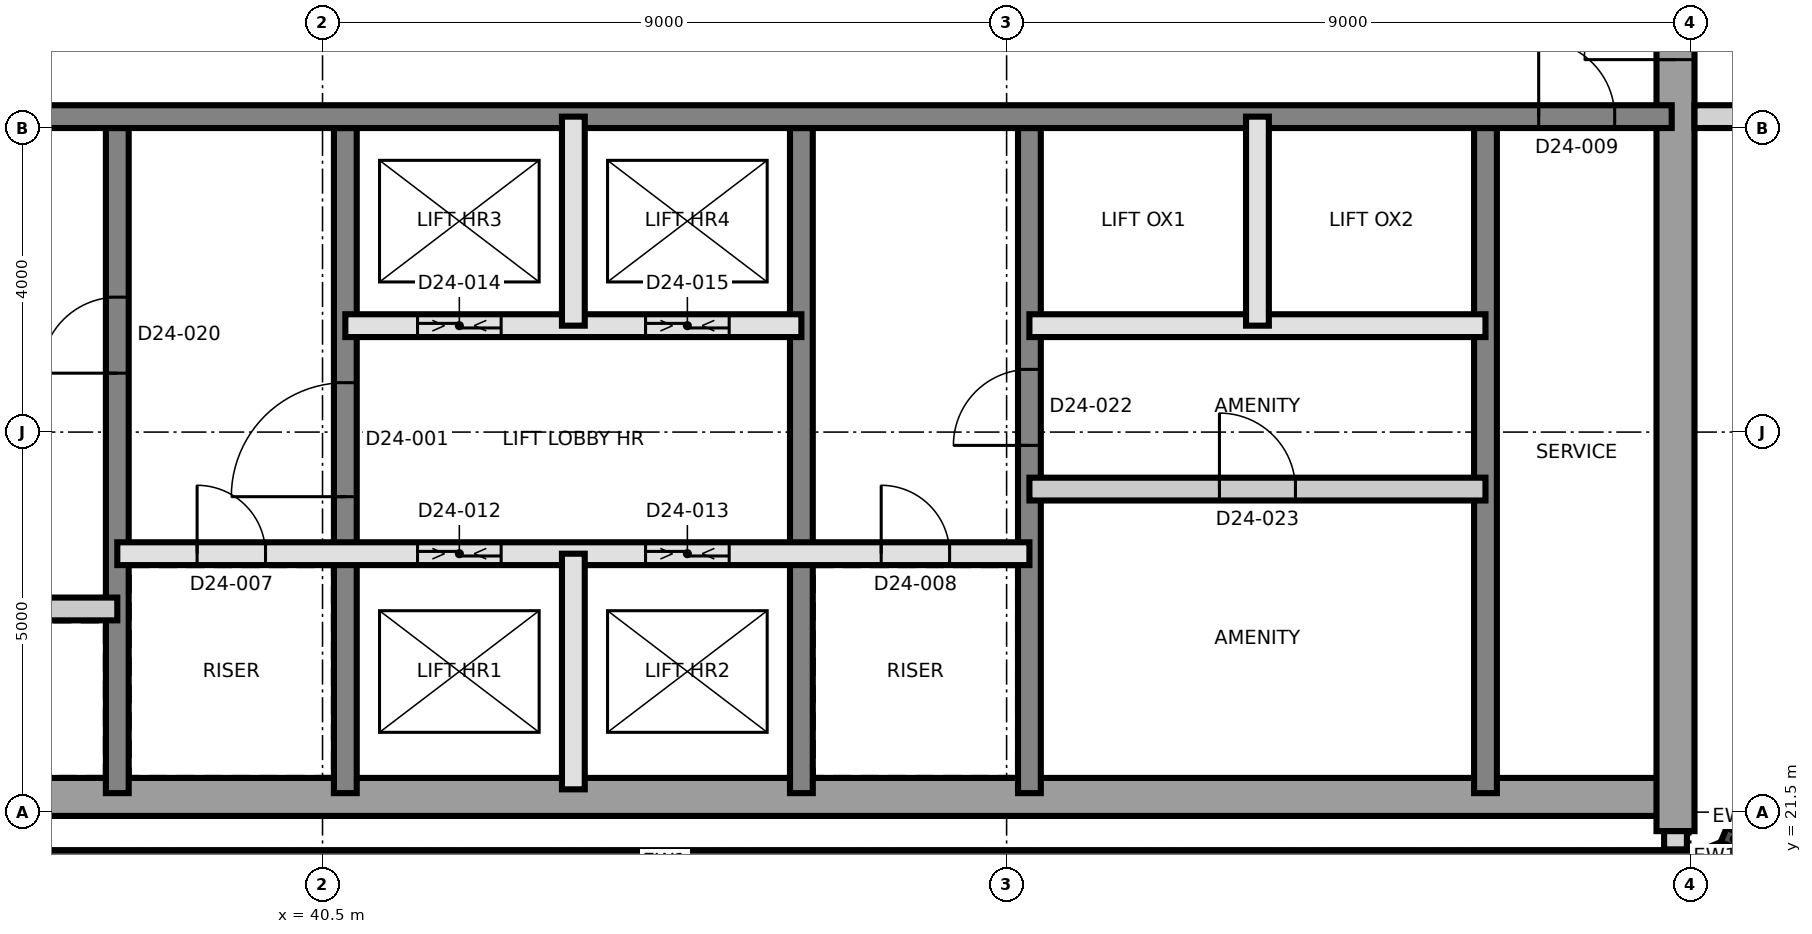
"""IFC4 building model, lengths in metres.
Left out: names, types, materials, properties, quantities, classifications, styles, units other than length and angle.
Written with IfcOpenShell. Run it as: python <this file> out.ifc"""

import sys

from ifc_helpers import new_model, si_unit, direction, frame, frame_2d, origin, place, context, subcontext, project, spatial, rectangle, extrude, element, fill, save


model = new_model("IFC4")
c1 = context("Model", 3, precision=1e-05, world=origin(), true_north=direction((0.0, 1.0)))
c2 = subcontext(c1, "Body", "Model", "MODEL_VIEW")
j1 = project(units=[si_unit("LENGTHUNIT", "METRE"), si_unit("PLANEANGLEUNIT", "RADIAN")], contexts=[c1])
p1 = place(None, origin())
s1 = spatial("IfcSite", under=j1, at=p1, CompositionType="ELEMENT")
p2 = place(p1, origin())
s2 = spatial("IfcBuilding", under=s1, at=p2, CompositionType="ELEMENT")
p3 = place(p2, frame((0.0, 0.0, 218.0)))
s3 = spatial("IfcBuildingStorey", under=s2, at=p3, CompositionType="ELEMENT", Elevation=218.0)
p4 = place(p3, frame((31.25, 21.7, 0.0), z_axis=(0.0, 0.0, 1.0), x_axis=(1.0, 0.0, 0.0)))
e1 = element("IfcWall", 1, at=p4, inside=s3, PredefinedType="SHEAR", context=c2, shape_type="SweptSolid", body=[
    extrude(rectangle(XDim=27.0, YDim=0.5, at=frame_2d((13.5, 0.0))), origin(), (0.0, 0.0, 1.0), 3.7),
])
p5 = place(p3, frame((58.3, 21.25, 0.0), z_axis=(0.0, 0.0, 1.0), x_axis=(0.0, 1.0, 0.0)))
e2 = element("IfcWall", 2, at=p5, inside=s3, PredefinedType="SHEAR", context=c2, shape_type="SweptSolid", body=[
    extrude(rectangle(XDim=18.5, YDim=0.5, at=frame_2d((9.25, 0.0))), origin(), (0.0, 0.0, 1.0), 3.7),
])
p6 = place(p5, frame((10.15, 0.0, 0.0)))
e3 = element("IfcOpeningElement", 3, at=p6, cuts=e2, PredefinedType="OPENING", context=c2, shape_type="SweptSolid", body=[
    extrude(rectangle(XDim=1.2, YDim=2.1, at=frame_2d((0.6, 1.05))), frame((0.0, 0.26, 0.0), z_axis=(0.0, -1.0, 0.0), x_axis=(1.0, 0.0, 0.0)), (0.0, 0.0, 1.0), 0.52),
])
p7 = place(p3, frame((37.8, 21.75, 0.0), z_axis=(0.0, 0.0, 1.0), x_axis=(0.0, 1.0, 0.0)))
e4 = element("IfcWall", 4, at=p7, inside=s3, PredefinedType="SHEAR", context=c2, shape_type="SweptSolid", body=[
    extrude(rectangle(XDim=8.75, YDim=0.3, at=frame_2d((4.375, 0.0))), origin(), (0.0, 0.0, 1.0), 3.7),
])
p8 = place(p7, frame((5.525, 0.0, 0.0)))
e5 = element("IfcOpeningElement", 5, at=p8, cuts=e4, PredefinedType="OPENING", context=c2, shape_type="SweptSolid", body=[
    extrude(rectangle(XDim=1.0, YDim=2.1, at=frame_2d((0.5, 1.05))), frame((0.0, 0.16, 0.0), z_axis=(0.0, -1.0, 0.0), x_axis=(1.0, 0.0, 0.0)), (0.0, 0.0, 1.0), 0.32),
])
p9 = place(p3, frame((40.8, 21.75, 0.0), z_axis=(0.0, 0.0, 1.0), x_axis=(0.0, 1.0, 0.0)))
e6 = element("IfcWall", 6, at=p9, inside=s3, PredefinedType="SHEAR", context=c2, shape_type="SweptSolid", body=[
    extrude(rectangle(XDim=8.75, YDim=0.3, at=frame_2d((4.375, 0.0))), origin(), (0.0, 0.0, 1.0), 3.7),
])
p10 = place(p9, frame((3.9, 0.0, 0.0)))
e7 = element("IfcOpeningElement", 7, at=p10, cuts=e6, PredefinedType="OPENING", context=c2, shape_type="SweptSolid", body=[
    extrude(rectangle(XDim=1.5, YDim=2.1, at=frame_2d((0.75, 1.05))), frame((0.0, 0.16, 0.0), z_axis=(0.0, -1.0, 0.0), x_axis=(1.0, 0.0, 0.0)), (0.0, 0.0, 1.0), 0.32),
])
p11 = place(p3, frame((46.8, 21.75, 0.0), z_axis=(0.0, 0.0, 1.0), x_axis=(0.0, 1.0, 0.0)))
e8 = element("IfcWall", 8, at=p11, inside=s3, PredefinedType="SHEAR", context=c2, shape_type="SweptSolid", body=[
    extrude(rectangle(XDim=8.75, YDim=0.3, at=frame_2d((4.375, 0.0))), origin(), (0.0, 0.0, 1.0), 3.7),
])
p12 = place(p3, frame((49.8, 21.75, 0.0), z_axis=(0.0, 0.0, 1.0), x_axis=(0.0, 1.0, 0.0)))
e9 = element("IfcWall", 9, at=p12, inside=s3, PredefinedType="SHEAR", context=c2, shape_type="SweptSolid", body=[
    extrude(rectangle(XDim=8.75, YDim=0.3, at=frame_2d((4.375, 0.0))), origin(), (0.0, 0.0, 1.0), 3.7),
])
p13 = place(p12, frame((4.575, 0.0, 0.0)))
e10 = element("IfcOpeningElement", 10, at=p13, cuts=e9, PredefinedType="OPENING", context=c2, shape_type="SweptSolid", body=[
    extrude(rectangle(XDim=1.0, YDim=2.1, at=frame_2d((0.5, 1.05))), frame((0.0, 0.16, 0.0), z_axis=(0.0, -1.0, 0.0), x_axis=(1.0, 0.0, 0.0)), (0.0, 0.0, 1.0), 0.32),
])
p14 = place(p3, frame((55.8, 21.75, 0.0), z_axis=(0.0, 0.0, 1.0), x_axis=(0.0, 1.0, 0.0)))
e11 = element("IfcWall", 11, at=p14, inside=s3, PredefinedType="SHEAR", context=c2, shape_type="SweptSolid", body=[
    extrude(rectangle(XDim=8.75, YDim=0.3, at=frame_2d((4.375, 0.0))), origin(), (0.0, 0.0, 1.0), 3.7),
])
p15 = place(p3, frame((31.75, 30.65, 0.0), z_axis=(0.0, 0.0, 1.0), x_axis=(1.0, 0.0, 0.0)))
e12 = element("IfcWall", 12, at=p15, inside=s3, PredefinedType="SHEAR", context=c2, shape_type="SweptSolid", body=[
    extrude(rectangle(XDim=26.5, YDim=0.3, at=frame_2d((13.25, 0.0))), origin(), (0.0, 0.0, 1.0), 3.7),
])
p16 = place(p15, frame((24.75, 0.0, 0.0)))
e13 = element("IfcOpeningElement", 13, at=p16, cuts=e12, PredefinedType="OPENING", context=c2, shape_type="SweptSolid", body=[
    extrude(rectangle(XDim=1.0, YDim=2.1, at=frame_2d((0.5, 1.05))), frame((0.0, 0.16, 0.0), z_axis=(0.0, -1.0, 0.0), x_axis=(1.0, 0.0, 0.0)), (0.0, 0.0, 1.0), 0.32),
])
p17 = place(p3, frame((31.36, 20.85, 0.0), z_axis=(0.0, 0.0, 1.0), x_axis=(1.0, 0.0, 0.0)))
e14 = element("IfcWall", 14, at=p17, inside=s3, PredefinedType="SOLIDWALL", context=c2, shape_type="SweptSolid", body=[
    extrude(rectangle(XDim=27.281, YDim=0.3, at=frame_2d((13.64, 0.0))), origin(), (0.0, 0.0, 1.0), 3.4),
])
p18 = place(p3, frame((58.698, 20.861, 0.0), z_axis=(0.0, 0.0, 1.0), x_axis=(0.923757413239, 0.38297812142, 0.0)))
e15 = element("IfcWall", 15, at=p18, inside=s3, PredefinedType="SOLIDWALL", context=c2, shape_type="SweptSolid", body=[
    extrude(rectangle(XDim=0.275, YDim=0.3, at=frame_2d((0.138, 0.0))), origin(), (0.0, 0.0, 1.0), 3.4),
])
p19 = place(p3, frame((59.033, 21.048, 0.0), z_axis=(0.0, 0.0, 1.0), x_axis=(0.383262727373, 0.923639367831, 0.0)))
e16 = element("IfcWall", 16, at=p19, inside=s3, PredefinedType="SOLIDWALL", context=c2, shape_type="SweptSolid", body=[
    extrude(rectangle(XDim=0.205, YDim=0.3, at=frame_2d((0.103, 0.0))), origin(), (0.0, 0.0, 1.0), 3.4),
])
p20 = place(p3, frame((31.8, 24.173, 0.0), z_axis=(0.0, 0.0, 1.0), x_axis=(1.0, 0.0, 0.0)))
e17 = element("IfcWall", 17, at=p20, inside=s3, PredefinedType="PARTITIONING", context=c2, shape_type="SweptSolid", body=[
    extrude(rectangle(XDim=6.0, YDim=0.3, at=frame_2d((3.0, 0.0))), origin(), (0.0, 0.0, 1.0), 3.4),
])
p21 = place(p20, frame((2.5, 0.0, 0.0)))
e18 = element("IfcOpeningElement", 18, at=p21, cuts=e17, PredefinedType="OPENING", context=c2, shape_type="SweptSolid", body=[
    extrude(rectangle(XDim=1.0, YDim=2.1, at=frame_2d((0.5, 1.05))), frame((0.0, 0.16, 0.0), z_axis=(0.0, -1.0, 0.0), x_axis=(1.0, 0.0, 0.0)), (0.0, 0.0, 1.0), 0.32),
])
p22 = place(p3, frame((37.8, 24.9, 0.0), z_axis=(0.0, 0.0, 1.0), x_axis=(1.0, 0.0, 0.0)))
e19 = element("IfcWall", 19, at=p22, inside=s3, PredefinedType="SOLIDWALL", context=c2, shape_type="SweptSolid", body=[
    extrude(rectangle(XDim=12.0, YDim=0.3, at=frame_2d((6.0, 0.0))), origin(), (0.0, 0.0, 1.0), 3.4),
])
p23 = place(p22, frame((1.05, 0.0, 0.0)))
e20 = element("IfcOpeningElement", 20, at=p23, cuts=e19, PredefinedType="OPENING", context=c2, shape_type="SweptSolid", body=[
    extrude(rectangle(XDim=0.9, YDim=2.1, at=frame_2d((0.45, 1.05))), frame((0.0, 0.16, 0.0), z_axis=(0.0, -1.0, 0.0), x_axis=(1.0, 0.0, 0.0)), (0.0, 0.0, 1.0), 0.32),
])
p24 = place(p22, frame((10.05, 0.0, 0.0)))
e21 = element("IfcOpeningElement", 21, at=p24, cuts=e19, PredefinedType="OPENING", context=c2, shape_type="SweptSolid", body=[
    extrude(rectangle(XDim=0.9, YDim=2.1, at=frame_2d((0.45, 1.05))), frame((0.0, 0.16, 0.0), z_axis=(0.0, -1.0, 0.0), x_axis=(1.0, 0.0, 0.0)), (0.0, 0.0, 1.0), 0.32),
])
p25 = place(p22, frame((3.95, 0.0, 0.0)))
e22 = element("IfcOpeningElement", 22, at=p25, cuts=e19, PredefinedType="OPENING", context=c2, shape_type="SweptSolid", body=[
    extrude(rectangle(XDim=1.1, YDim=2.4, at=frame_2d((0.55, 1.2))), frame((0.0, 0.16, 0.0), z_axis=(0.0, -1.0, 0.0), x_axis=(1.0, 0.0, 0.0)), (0.0, 0.0, 1.0), 0.32),
])
p26 = place(p22, frame((6.95, 0.0, 0.0)))
e23 = element("IfcOpeningElement", 23, at=p26, cuts=e19, PredefinedType="OPENING", context=c2, shape_type="SweptSolid", body=[
    extrude(rectangle(XDim=1.1, YDim=2.4, at=frame_2d((0.55, 1.2))), frame((0.0, 0.16, 0.0), z_axis=(0.0, -1.0, 0.0), x_axis=(1.0, 0.0, 0.0)), (0.0, 0.0, 1.0), 0.32),
])
p27 = place(p3, frame((49.8, 25.75, 0.0), z_axis=(0.0, 0.0, 1.0), x_axis=(1.0, 0.0, 0.0)))
e24 = element("IfcWall", 24, at=p27, inside=s3, PredefinedType="PARTITIONING", context=c2, shape_type="SweptSolid", body=[
    extrude(rectangle(XDim=6.0, YDim=0.3, at=frame_2d((3.0, 0.0))), origin(), (0.0, 0.0, 1.0), 3.4),
])
p28 = place(p27, frame((2.5, 0.0, 0.0)))
e25 = element("IfcOpeningElement", 25, at=p28, cuts=e24, PredefinedType="OPENING", context=c2, shape_type="SweptSolid", body=[
    extrude(rectangle(XDim=1.0, YDim=2.1, at=frame_2d((0.5, 1.05))), frame((0.0, 0.16, 0.0), z_axis=(0.0, -1.0, 0.0), x_axis=(1.0, 0.0, 0.0)), (0.0, 0.0, 1.0), 0.32),
])
p29 = place(p3, frame((40.8, 27.9, 0.0), z_axis=(0.0, 0.0, 1.0), x_axis=(1.0, 0.0, 0.0)))
e26 = element("IfcWall", 26, at=p29, inside=s3, PredefinedType="SOLIDWALL", context=c2, shape_type="SweptSolid", body=[
    extrude(rectangle(XDim=6.0, YDim=0.3, at=frame_2d((3.0, 0.0))), origin(), (0.0, 0.0, 1.0), 3.4),
])
p30 = place(p29, frame((0.95, 0.0, 0.0)))
e27 = element("IfcOpeningElement", 27, at=p30, cuts=e26, PredefinedType="OPENING", context=c2, shape_type="SweptSolid", body=[
    extrude(rectangle(XDim=1.1, YDim=2.4, at=frame_2d((0.55, 1.2))), frame((0.0, 0.16, 0.0), z_axis=(0.0, -1.0, 0.0), x_axis=(1.0, 0.0, 0.0)), (0.0, 0.0, 1.0), 0.32),
])
p31 = place(p29, frame((3.95, 0.0, 0.0)))
e28 = element("IfcOpeningElement", 28, at=p31, cuts=e26, PredefinedType="OPENING", context=c2, shape_type="SweptSolid", body=[
    extrude(rectangle(XDim=1.1, YDim=2.4, at=frame_2d((0.55, 1.2))), frame((0.0, 0.16, 0.0), z_axis=(0.0, -1.0, 0.0), x_axis=(1.0, 0.0, 0.0)), (0.0, 0.0, 1.0), 0.32),
])
p32 = place(p3, frame((49.8, 27.9, 0.0), z_axis=(0.0, 0.0, 1.0), x_axis=(1.0, 0.0, 0.0)))
e29 = element("IfcWall", 29, at=p32, inside=s3, PredefinedType="SOLIDWALL", context=c2, shape_type="SweptSolid", body=[
    extrude(rectangle(XDim=6.0, YDim=0.3, at=frame_2d((3.0, 0.0))), origin(), (0.0, 0.0, 1.0), 3.4),
])
p33 = place(p3, frame((43.8, 21.8, 0.0), z_axis=(0.0, 0.0, 1.0), x_axis=(0.0, 1.0, 0.0)))
e30 = element("IfcWall", 30, at=p33, inside=s3, PredefinedType="SOLIDWALL", context=c2, shape_type="SweptSolid", body=[
    extrude(rectangle(XDim=3.1, YDim=0.3, at=frame_2d((1.55, 0.0))), origin(), (0.0, 0.0, 1.0), 3.4),
])
for number, where, z_axis, x_axis in (
    (31, (43.8, 27.9, 0.0), (0.0, 0.0, 1.0), (0.0, 1.0, 0.0)),
    (32, (52.8, 27.9, 0.0), (0.0, 0.0, 1.0), (0.0, 1.0, 0.0)),
):
    element("IfcWall", number, at=place(p3, frame(where, z_axis=z_axis, x_axis=x_axis)), inside=s3, PredefinedType="SOLIDWALL", context=c2, shape_type="SweptSolid", body=[
        extrude(rectangle(XDim=2.75, YDim=0.3, at=frame_2d((1.375, 0.0))), origin(), (0.0, 0.0, 1.0), 3.4),
    ])
p34 = place(p3, frame((58.55, 30.65, 0.0), z_axis=(0.0, 0.0, 1.0), x_axis=(1.0, 0.0, 0.0)))
e33 = element("IfcWall", 33, at=p34, inside=s3, PredefinedType="PARTITIONING", context=c2, shape_type="SweptSolid", body=[
    extrude(rectangle(XDim=26.78, YDim=0.3, at=frame_2d((13.39, 0.0))), origin(), (0.0, 0.0, 1.0), 3.4),
])
p35 = place(p34, frame((2.3, 0.0, 0.0)))
e34 = element("IfcOpeningElement", 34, at=p35, cuts=e33, PredefinedType="OPENING", context=c2, shape_type="SweptSolid", body=[
    extrude(rectangle(XDim=1.0, YDim=2.4, at=frame_2d((0.5, 1.2))), frame((0.0, 0.16, 0.0), z_axis=(0.0, -1.0, 0.0), x_axis=(1.0, 0.0, 0.0)), (0.0, 0.0, 1.0), 0.32),
])
p36 = place(p34, frame((10.1, 0.0, 0.0)))
e35 = element("IfcOpeningElement", 35, at=p36, cuts=e33, PredefinedType="OPENING", context=c2, shape_type="SweptSolid", body=[
    extrude(rectangle(XDim=1.0, YDim=2.1, at=frame_2d((0.5, 1.05))), frame((0.0, 0.16, 0.0), z_axis=(0.0, -1.0, 0.0), x_axis=(1.0, 0.0, 0.0)), (0.0, 0.0, 1.0), 0.32),
])
p37 = place(p34, frame((15.95, 0.0, 0.0)))
e36 = element("IfcOpeningElement", 36, at=p37, cuts=e33, PredefinedType="OPENING", context=c2, shape_type="SweptSolid", body=[
    extrude(rectangle(XDim=1.0, YDim=2.1, at=frame_2d((0.5, 1.05))), frame((0.0, 0.16, 0.0), z_axis=(0.0, -1.0, 0.0), x_axis=(1.0, 0.0, 0.0)), (0.0, 0.0, 1.0), 0.32),
])
p38 = place(p34, frame((19.085, 0.0, 0.0)))
e37 = element("IfcOpeningElement", 37, at=p38, cuts=e33, PredefinedType="OPENING", context=c2, shape_type="SweptSolid", body=[
    extrude(rectangle(XDim=1.2, YDim=2.1, at=frame_2d((0.6, 1.05))), frame((0.0, 0.16, 0.0), z_axis=(0.0, -1.0, 0.0), x_axis=(1.0, 0.0, 0.0)), (0.0, 0.0, 1.0), 0.32),
])
p39 = place(p34, frame((22.335, 0.0, 0.0)))
e38 = element("IfcOpeningElement", 38, at=p39, cuts=e33, PredefinedType="OPENING", context=c2, shape_type="SweptSolid", body=[
    extrude(rectangle(XDim=1.0, YDim=2.1, at=frame_2d((0.5, 1.05))), frame((0.0, 0.16, 0.0), z_axis=(0.0, -1.0, 0.0), x_axis=(1.0, 0.0, 0.0)), (0.0, 0.0, 1.0), 0.32),
])
p40 = place(p3, frame((58.3, 21.25, 0.0), z_axis=(0.0, 0.0, 1.0), x_axis=(0.0, -1.0, 0.0)))
e39 = element("IfcWall", 39, at=p40, inside=s3, PredefinedType="PARTITIONING", context=c2, shape_type="SweptSolid", body=[
    extrude(rectangle(XDim=0.24, YDim=0.3, at=frame_2d((0.12, 0.0))), origin(), (0.0, 0.0, 1.0), 3.4),
])
p41 = place(p10, origin())
e40 = element("IfcDoor", 40, at=p41, inside=s3, OperationType="SINGLE_SWING_RIGHT", PredefinedType="DOOR", context=c2, shape_type="SweptSolid", body=[
    extrude(rectangle(XDim=1.5, YDim=2.1, at=frame_2d((0.75, 1.05))), frame((0.0, 0.025, 0.0), z_axis=(0.0, -1.0, 0.0), x_axis=(1.0, 0.0, 0.0)), (0.0, 0.0, 1.0), 0.05),
])
fill(e7, e40)
p42 = place(p23, origin())
e41 = element("IfcDoor", 41, at=p42, inside=s3, OperationType="SINGLE_SWING_LEFT", PredefinedType="DOOR", context=c2, shape_type="SweptSolid", body=[
    extrude(rectangle(XDim=0.9, YDim=2.1, at=frame_2d((0.45, 1.05))), frame((0.0, 0.025, 0.0), z_axis=(0.0, -1.0, 0.0), x_axis=(1.0, 0.0, 0.0)), (0.0, 0.0, 1.0), 0.05),
])
fill(e20, e41)
p43 = place(p24, origin())
e42 = element("IfcDoor", 42, at=p43, inside=s3, OperationType="SINGLE_SWING_RIGHT", PredefinedType="DOOR", context=c2, shape_type="SweptSolid", body=[
    extrude(rectangle(XDim=0.9, YDim=2.1, at=frame_2d((0.45, 1.05))), frame((0.0, 0.025, 0.0), z_axis=(0.0, -1.0, 0.0), x_axis=(1.0, 0.0, 0.0)), (0.0, 0.0, 1.0), 0.05),
])
fill(e21, e42)
p44 = place(p16, origin())
e43 = element("IfcDoor", 43, at=p44, inside=s3, OperationType="SINGLE_SWING_LEFT", PredefinedType="DOOR", context=c2, shape_type="SweptSolid", body=[
    extrude(rectangle(XDim=1.0, YDim=2.1, at=frame_2d((0.5, 1.05))), frame((0.0, 0.025, 0.0), z_axis=(0.0, -1.0, 0.0), x_axis=(1.0, 0.0, 0.0)), (0.0, 0.0, 1.0), 0.05),
])
fill(e13, e43)
p45 = place(p6, origin())
e44 = element("IfcDoor", 44, at=p45, inside=s3, OperationType="SINGLE_SWING_LEFT", PredefinedType="DOOR", context=c2, shape_type="SweptSolid", body=[
    extrude(rectangle(XDim=1.2, YDim=2.1, at=frame_2d((0.6, 1.05))), frame((0.0, 0.025, 0.0), z_axis=(0.0, -1.0, 0.0), x_axis=(1.0, 0.0, 0.0)), (0.0, 0.0, 1.0), 0.05),
])
fill(e3, e44)
p46 = place(p25, origin())
e45 = element("IfcDoor", 45, at=p46, inside=s3, OperationType="SLIDING_TO_LEFT", PredefinedType="DOOR", context=c2, shape_type="SweptSolid", body=[
    extrude(rectangle(XDim=1.1, YDim=2.4, at=frame_2d((0.55, 1.2))), frame((0.0, 0.025, 0.0), z_axis=(0.0, -1.0, 0.0), x_axis=(1.0, 0.0, 0.0)), (0.0, 0.0, 1.0), 0.05),
])
fill(e22, e45)
p47 = place(p26, origin())
e46 = element("IfcDoor", 46, at=p47, inside=s3, OperationType="SLIDING_TO_LEFT", PredefinedType="DOOR", context=c2, shape_type="SweptSolid", body=[
    extrude(rectangle(XDim=1.1, YDim=2.4, at=frame_2d((0.55, 1.2))), frame((0.0, 0.025, 0.0), z_axis=(0.0, -1.0, 0.0), x_axis=(1.0, 0.0, 0.0)), (0.0, 0.0, 1.0), 0.05),
])
fill(e23, e46)
p48 = place(p30, origin())
e47 = element("IfcDoor", 47, at=p48, inside=s3, OperationType="SLIDING_TO_LEFT", PredefinedType="DOOR", context=c2, shape_type="SweptSolid", body=[
    extrude(rectangle(XDim=1.1, YDim=2.4, at=frame_2d((0.55, 1.2))), frame((0.0, 0.025, 0.0), z_axis=(0.0, -1.0, 0.0), x_axis=(1.0, 0.0, 0.0)), (0.0, 0.0, 1.0), 0.05),
])
fill(e27, e47)
p49 = place(p31, origin())
e48 = element("IfcDoor", 48, at=p49, inside=s3, OperationType="SLIDING_TO_LEFT", PredefinedType="DOOR", context=c2, shape_type="SweptSolid", body=[
    extrude(rectangle(XDim=1.1, YDim=2.4, at=frame_2d((0.55, 1.2))), frame((0.0, 0.025, 0.0), z_axis=(0.0, -1.0, 0.0), x_axis=(1.0, 0.0, 0.0)), (0.0, 0.0, 1.0), 0.05),
])
fill(e28, e48)
p50 = place(p8, origin())
e49 = element("IfcDoor", 49, at=p50, inside=s3, OperationType="SINGLE_SWING_LEFT", PredefinedType="DOOR", context=c2, shape_type="SweptSolid", body=[
    extrude(rectangle(XDim=1.0, YDim=2.1, at=frame_2d((0.5, 1.05))), frame((0.0, 0.025, 0.0), z_axis=(0.0, -1.0, 0.0), x_axis=(1.0, 0.0, 0.0)), (0.0, 0.0, 1.0), 0.05),
])
fill(e5, e49)
p51 = place(p13, origin())
e50 = element("IfcDoor", 50, at=p51, inside=s3, OperationType="SINGLE_SWING_LEFT", PredefinedType="DOOR", context=c2, shape_type="SweptSolid", body=[
    extrude(rectangle(XDim=1.0, YDim=2.1, at=frame_2d((0.5, 1.05))), frame((0.0, 0.025, 0.0), z_axis=(0.0, -1.0, 0.0), x_axis=(1.0, 0.0, 0.0)), (0.0, 0.0, 1.0), 0.05),
])
fill(e10, e50)
p52 = place(p28, origin())
e51 = element("IfcDoor", 51, at=p52, inside=s3, OperationType="SINGLE_SWING_RIGHT", PredefinedType="DOOR", context=c2, shape_type="SweptSolid", body=[
    extrude(rectangle(XDim=1.0, YDim=2.1, at=frame_2d((0.5, 1.05))), frame((0.0, 0.025, 0.0), z_axis=(0.0, -1.0, 0.0), x_axis=(1.0, 0.0, 0.0)), (0.0, 0.0, 1.0), 0.05),
])
fill(e25, e51)
save(model, sys.argv[1])
